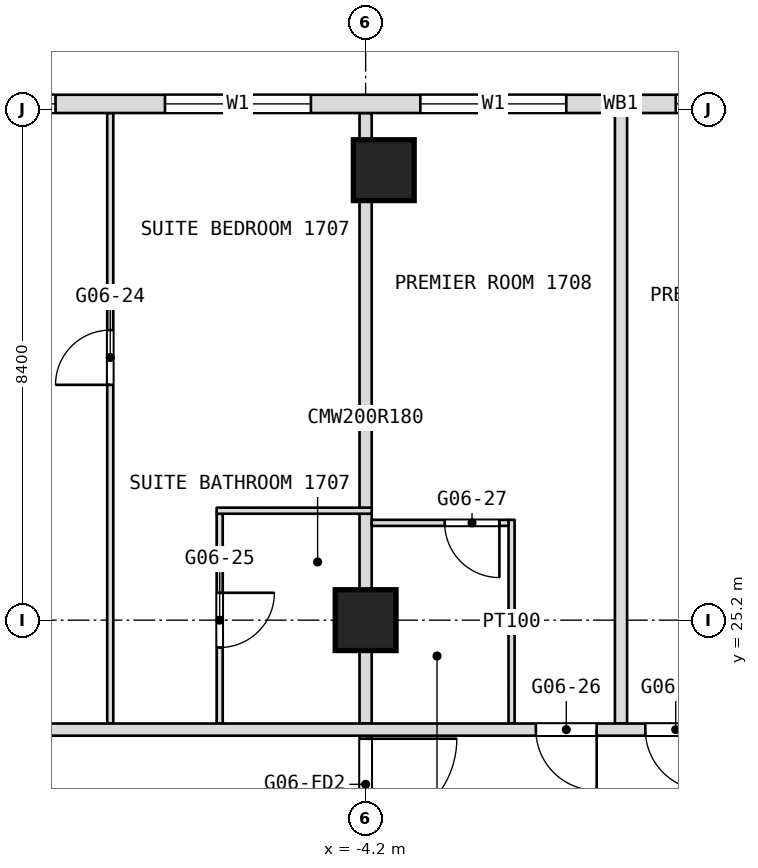
"""IFC4 building model, lengths in metres.
Left out: names, types, materials, properties, quantities, classifications, styles, units other than length and angle.
Written with IfcOpenShell. Run it as: python <this file> out.ifc"""

import sys

from ifc_helpers import new_model, si_unit, direction, frame, frame_2d, origin, origin_2d, place, context, subcontext, project, spatial, rectangle, extrude, element, fill, save


model = new_model("IFC4")
c1 = context("Model", 3, precision=1e-05, world=origin(), true_north=direction((0.0, 1.0)))
c2 = subcontext(c1, "Body", "Model", "MODEL_VIEW")
j1 = project(units=[si_unit("LENGTHUNIT", "METRE"), si_unit("PLANEANGLEUNIT", "RADIAN")], contexts=[c1])
p1 = place(None, origin())
s1 = spatial("IfcSite", under=j1, at=p1, CompositionType="ELEMENT")
p2 = place(p1, origin())
s2 = spatial("IfcBuilding", under=s1, at=p2, CompositionType="ELEMENT")
p3 = place(p2, frame((0.0, 0.0, 76.1)))
s3 = spatial("IfcBuildingStorey", under=s2, at=p3, CompositionType="ELEMENT", Elevation=76.1)
for number, where, z_axis, x_axis in (
    (1, (-4.2, 25.2, 0.0), (0.0, 0.0, 1.0), (1.0, 0.0, 0.0)),
    (2, (-3.901, 32.6, 0.0), (0.0, 0.0, 1.0), (1.0, 0.0, 0.0)),
):
    element("IfcColumn", number, at=place(p3, frame(where, z_axis=z_axis, x_axis=x_axis)), inside=s3, PredefinedType="COLUMN", context=c2, shape_type="SweptSolid", body=[
        extrude(rectangle(XDim=1.0, YDim=1.0, at=origin_2d()), origin(), (0.0, 0.0, 1.0), 3.6),
    ])
p4 = place(p3, frame((0.0, 23.5, 0.0), z_axis=(0.0, 0.0, 1.0), x_axis=(0.0, 1.0, 0.0)))
e3 = element("IfcWall", 3, at=p4, inside=s3, PredefinedType="PARTITIONING", context=c2, shape_type="SweptSolid", body=[
    extrude(rectangle(XDim=10.04, YDim=0.2, at=frame_2d((5.02, 0.0))), origin(), (0.0, 0.0, 1.0), 3.34),
])
p5 = place(p3, frame((-1.8, 23.5, 0.0), z_axis=(0.0, 0.0, 1.0), x_axis=(0.0, 1.0, 0.0)))
e4 = element("IfcWall", 4, at=p5, inside=s3, PredefinedType="PARTITIONING", context=c2, shape_type="SweptSolid", body=[
    extrude(rectangle(XDim=3.35, YDim=0.1, at=frame_2d((1.675, 0.0))), origin(), (0.0, 0.0, 1.0), 3.34),
])
p6 = place(p3, frame((-4.2, 16.8, 0.0), z_axis=(0.0, 0.0, 1.0), x_axis=(0.0, 1.0, 0.0)))
e5 = element("IfcWall", 5, at=p6, inside=s3, PredefinedType="PARTITIONING", context=c2, shape_type="SweptSolid", body=[
    extrude(rectangle(XDim=6.7, YDim=0.2, at=frame_2d((3.35, 0.0))), origin(), (0.0, 0.0, 1.0), 3.34),
])
p7 = place(p6, frame((0.15, 0.0, 0.0)))
e6 = element("IfcOpeningElement", 6, at=p7, cuts=e5, PredefinedType="OPENING", context=c2, shape_type="SweptSolid", body=[
    extrude(rectangle(XDim=1.5, YDim=2.1, at=frame_2d((0.75, 1.05))), frame((0.0, 0.1, 0.0), z_axis=(0.0, -1.0, 0.0), x_axis=(1.0, 0.0, 0.0)), (0.0, 0.0, 1.0), 0.2),
])
p8 = place(p6, frame((4.95, 0.0, 0.0)))
e7 = element("IfcOpeningElement", 7, at=p8, cuts=e5, PredefinedType="OPENING", context=c2, shape_type="SweptSolid", body=[
    extrude(rectangle(XDim=1.5, YDim=2.1, at=frame_2d((0.75, 1.05))), frame((0.0, 0.1, 0.0), z_axis=(0.0, -1.0, 0.0), x_axis=(1.0, 0.0, 0.0)), (0.0, 0.0, 1.0), 0.2),
])
p9 = place(p3, frame((-4.2, 23.5, 0.0), z_axis=(0.0, 0.0, 1.0), x_axis=(0.0, 1.0, 0.0)))
e8 = element("IfcWall", 8, at=p9, inside=s3, PredefinedType="PARTITIONING", context=c2, shape_type="SweptSolid", body=[
    extrude(rectangle(XDim=10.04, YDim=0.2, at=frame_2d((5.02, 0.0))), origin(), (0.0, 0.0, 1.0), 3.34),
])
p10 = place(p3, frame((-6.6, 23.5, 0.0), z_axis=(0.0, 0.0, 1.0), x_axis=(0.0, 1.0, 0.0)))
e9 = element("IfcWall", 9, at=p10, inside=s3, PredefinedType="PARTITIONING", context=c2, shape_type="SweptSolid", body=[
    extrude(rectangle(XDim=3.45, YDim=0.1, at=frame_2d((1.725, 0.0))), origin(), (0.0, 0.0, 1.0), 3.34),
])
p11 = place(p10, frame((1.25, 0.0, 0.0)))
e10 = element("IfcOpeningElement", 10, at=p11, cuts=e9, PredefinedType="OPENING", context=c2, shape_type="SweptSolid", body=[
    extrude(rectangle(XDim=0.9, YDim=2.1, at=frame_2d((0.45, 1.05))), frame((0.0, 0.05, 0.0), z_axis=(0.0, -1.0, 0.0), x_axis=(1.0, 0.0, 0.0)), (0.0, 0.0, 1.0), 0.1),
])
p12 = place(p3, frame((-8.4, 23.5, 0.0), z_axis=(0.0, 0.0, 1.0), x_axis=(0.0, 1.0, 0.0)))
e11 = element("IfcWall", 11, at=p12, inside=s3, PredefinedType="PARTITIONING", context=c2, shape_type="SweptSolid", body=[
    extrude(rectangle(XDim=10.04, YDim=0.1, at=frame_2d((5.02, 0.0))), origin(), (0.0, 0.0, 1.0), 3.34),
])
p13 = place(p12, frame((5.57, 0.0, 0.0)))
e12 = element("IfcOpeningElement", 12, at=p13, cuts=e11, PredefinedType="OPENING", context=c2, shape_type="SweptSolid", body=[
    extrude(rectangle(XDim=0.9, YDim=2.1, at=frame_2d((0.45, 1.05))), frame((0.0, 0.05, 0.0), z_axis=(0.0, -1.0, 0.0), x_axis=(1.0, 0.0, 0.0)), (0.0, 0.0, 1.0), 0.1),
])
p14 = place(p3, frame((-16.7, 23.4, 0.0), z_axis=(0.0, 0.0, 1.0), x_axis=(1.0, 0.0, 0.0)))
e13 = element("IfcWall", 13, at=p14, inside=s3, PredefinedType="PARTITIONING", context=c2, shape_type="SweptSolid", body=[
    extrude(rectangle(XDim=23.4, YDim=0.2, at=frame_2d((11.7, 0.0))), origin(), (0.0, 0.0, 1.0), 3.34),
])
p15 = place(p14, frame((2.4, 0.0, 0.0)))
e14 = element("IfcOpeningElement", 14, at=p15, cuts=e13, PredefinedType="OPENING", context=c2, shape_type="SweptSolid", body=[
    extrude(rectangle(XDim=0.9, YDim=2.1, at=frame_2d((0.45, 1.05))), frame((0.0, 0.1, 0.0), z_axis=(0.0, -1.0, 0.0), x_axis=(1.0, 0.0, 0.0)), (0.0, 0.0, 1.0), 0.2),
])
p16 = place(p14, frame((5.65, 0.0, 0.0)))
e15 = element("IfcOpeningElement", 15, at=p16, cuts=e13, PredefinedType="OPENING", context=c2, shape_type="SweptSolid", body=[
    extrude(rectangle(XDim=1.1, YDim=2.1, at=frame_2d((0.55, 1.05))), frame((0.0, 0.1, 0.0), z_axis=(0.0, -1.0, 0.0), x_axis=(1.0, 0.0, 0.0)), (0.0, 0.0, 1.0), 0.2),
])
p17 = place(p14, frame((15.3, 0.0, 0.0)))
e16 = element("IfcOpeningElement", 16, at=p17, cuts=e13, PredefinedType="OPENING", context=c2, shape_type="SweptSolid", body=[
    extrude(rectangle(XDim=1.0, YDim=2.1, at=frame_2d((0.5, 1.05))), frame((0.0, 0.1, 0.0), z_axis=(0.0, -1.0, 0.0), x_axis=(1.0, 0.0, 0.0)), (0.0, 0.0, 1.0), 0.2),
])
p18 = place(p14, frame((17.1, 0.0, 0.0)))
e17 = element("IfcOpeningElement", 17, at=p18, cuts=e13, PredefinedType="OPENING", context=c2, shape_type="SweptSolid", body=[
    extrude(rectangle(XDim=1.0, YDim=2.1, at=frame_2d((0.5, 1.05))), frame((0.0, 0.1, 0.0), z_axis=(0.0, -1.0, 0.0), x_axis=(1.0, 0.0, 0.0)), (0.0, 0.0, 1.0), 0.2),
])
p19 = place(p3, frame((-4.1, 26.8, 0.0), z_axis=(0.0, 0.0, 1.0), x_axis=(1.0, 0.0, 0.0)))
e18 = element("IfcWall", 18, at=p19, inside=s3, PredefinedType="PARTITIONING", context=c2, shape_type="SweptSolid", body=[
    extrude(rectangle(XDim=2.25, YDim=0.1, at=frame_2d((1.125, 0.0))), origin(), (0.0, 0.0, 1.0), 3.34),
])
p20 = place(p19, frame((1.2, 0.0, 0.0)))
e19 = element("IfcOpeningElement", 19, at=p20, cuts=e18, PredefinedType="OPENING", context=c2, shape_type="SweptSolid", body=[
    extrude(rectangle(XDim=0.9, YDim=2.1, at=frame_2d((0.45, 1.05))), frame((0.0, 0.05, 0.0), z_axis=(0.0, -1.0, 0.0), x_axis=(1.0, 0.0, 0.0)), (0.0, 0.0, 1.0), 0.1),
])
p21 = place(p3, frame((-6.65, 27.0, 0.0), z_axis=(0.0, 0.0, 1.0), x_axis=(1.0, 0.0, 0.0)))
e20 = element("IfcWall", 20, at=p21, inside=s3, PredefinedType="PARTITIONING", context=c2, shape_type="SweptSolid", body=[
    extrude(rectangle(XDim=2.55, YDim=0.1, at=frame_2d((1.275, 0.0))), origin(), (0.0, 0.0, 1.0), 3.34),
])
p22 = place(p3, frame((23.406, 33.69, 0.0), z_axis=(0.0, 0.0, 1.0), x_axis=(-1.0, 0.0, 0.0)))
e21 = element("IfcWall", 21, at=p22, inside=s3, PredefinedType="NOTDEFINED", context=c2, shape_type="SweptSolid", body=[
    extrude(rectangle(XDim=46.812, YDim=0.3, at=frame_2d((23.406, 0.0))), origin(), (0.0, 0.0, 1.0), 3.6),
])
p23 = place(p22, frame((2.186, 0.0, 0.9)))
e22 = element("IfcOpeningElement", 22, at=p23, cuts=e21, PredefinedType="OPENING", context=c2, shape_type="SweptSolid", body=[
    extrude(rectangle(XDim=2.4, YDim=2.1, at=frame_2d((1.2, 1.05))), frame((0.0, 0.15, 0.0), z_axis=(0.0, -1.0, 0.0), x_axis=(1.0, 0.0, 0.0)), (0.0, 0.0, 1.0), 0.3),
])
p24 = place(p22, frame((7.506, 0.0, 0.9)))
e23 = element("IfcOpeningElement", 23, at=p24, cuts=e21, PredefinedType="OPENING", context=c2, shape_type="SweptSolid", body=[
    extrude(rectangle(XDim=2.4, YDim=2.1, at=frame_2d((1.2, 1.05))), frame((0.0, 0.15, 0.0), z_axis=(0.0, -1.0, 0.0), x_axis=(1.0, 0.0, 0.0)), (0.0, 0.0, 1.0), 0.3),
])
p25 = place(p22, frame((11.706, 0.0, 0.9)))
e24 = element("IfcOpeningElement", 24, at=p25, cuts=e21, PredefinedType="OPENING", context=c2, shape_type="SweptSolid", body=[
    extrude(rectangle(XDim=2.4, YDim=2.1, at=frame_2d((1.2, 1.05))), frame((0.0, 0.15, 0.0), z_axis=(0.0, -1.0, 0.0), x_axis=(1.0, 0.0, 0.0)), (0.0, 0.0, 1.0), 0.3),
])
p26 = place(p22, frame((15.906, 0.0, 0.9)))
e25 = element("IfcOpeningElement", 25, at=p26, cuts=e21, PredefinedType="OPENING", context=c2, shape_type="SweptSolid", body=[
    extrude(rectangle(XDim=2.4, YDim=2.1, at=frame_2d((1.2, 1.05))), frame((0.0, 0.15, 0.0), z_axis=(0.0, -1.0, 0.0), x_axis=(1.0, 0.0, 0.0)), (0.0, 0.0, 1.0), 0.3),
])
p27 = place(p22, frame((20.106, 0.0, 0.9)))
e26 = element("IfcOpeningElement", 26, at=p27, cuts=e21, PredefinedType="OPENING", context=c2, shape_type="SweptSolid", body=[
    extrude(rectangle(XDim=2.4, YDim=2.1, at=frame_2d((1.2, 1.05))), frame((0.0, 0.15, 0.0), z_axis=(0.0, -1.0, 0.0), x_axis=(1.0, 0.0, 0.0)), (0.0, 0.0, 1.0), 0.3),
])
p28 = place(p22, frame((24.306, 0.0, 0.9)))
e27 = element("IfcOpeningElement", 27, at=p28, cuts=e21, PredefinedType="OPENING", context=c2, shape_type="SweptSolid", body=[
    extrude(rectangle(XDim=2.4, YDim=2.1, at=frame_2d((1.2, 1.05))), frame((0.0, 0.15, 0.0), z_axis=(0.0, -1.0, 0.0), x_axis=(1.0, 0.0, 0.0)), (0.0, 0.0, 1.0), 0.3),
])
p29 = place(p22, frame((28.506, 0.0, 0.9)))
e28 = element("IfcOpeningElement", 28, at=p29, cuts=e21, PredefinedType="OPENING", context=c2, shape_type="SweptSolid", body=[
    extrude(rectangle(XDim=2.4, YDim=2.1, at=frame_2d((1.2, 1.05))), frame((0.0, 0.15, 0.0), z_axis=(0.0, -1.0, 0.0), x_axis=(1.0, 0.0, 0.0)), (0.0, 0.0, 1.0), 0.3),
])
p30 = place(p22, frame((32.706, 0.0, 0.9)))
e29 = element("IfcOpeningElement", 29, at=p30, cuts=e21, PredefinedType="OPENING", context=c2, shape_type="SweptSolid", body=[
    extrude(rectangle(XDim=2.4, YDim=2.1, at=frame_2d((1.2, 1.05))), frame((0.0, 0.15, 0.0), z_axis=(0.0, -1.0, 0.0), x_axis=(1.0, 0.0, 0.0)), (0.0, 0.0, 1.0), 0.3),
])
p31 = place(p22, frame((36.906, 0.0, 0.9)))
e30 = element("IfcOpeningElement", 30, at=p31, cuts=e21, PredefinedType="OPENING", context=c2, shape_type="SweptSolid", body=[
    extrude(rectangle(XDim=2.4, YDim=2.1, at=frame_2d((1.2, 1.05))), frame((0.0, 0.15, 0.0), z_axis=(0.0, -1.0, 0.0), x_axis=(1.0, 0.0, 0.0)), (0.0, 0.0, 1.0), 0.3),
])
p32 = place(p22, frame((42.226, 0.0, 0.9)))
e31 = element("IfcOpeningElement", 31, at=p32, cuts=e21, PredefinedType="OPENING", context=c2, shape_type="SweptSolid", body=[
    extrude(rectangle(XDim=2.4, YDim=2.1, at=frame_2d((1.2, 1.05))), frame((0.0, 0.15, 0.0), z_axis=(0.0, -1.0, 0.0), x_axis=(1.0, 0.0, 0.0)), (0.0, 0.0, 1.0), 0.3),
])
p33 = place(p11, origin())
e32 = element("IfcDoor", 32, at=p33, inside=s3, OperationType="SINGLE_SWING_RIGHT", PredefinedType="DOOR", context=c2, shape_type="SweptSolid", body=[
    extrude(rectangle(XDim=0.9, YDim=2.1, at=frame_2d((0.45, 1.05))), frame((0.0, 0.025, 0.0), z_axis=(0.0, -1.0, 0.0), x_axis=(1.0, 0.0, 0.0)), (0.0, 0.0, 1.0), 0.05),
])
fill(e10, e32)
p34 = place(p13, origin())
e33 = element("IfcDoor", 33, at=p34, inside=s3, OperationType="SINGLE_SWING_RIGHT", PredefinedType="DOOR", context=c2, shape_type="SweptSolid", body=[
    extrude(rectangle(XDim=0.9, YDim=2.1, at=frame_2d((0.45, 1.05))), frame((0.0, 0.025, 0.0), z_axis=(0.0, -1.0, 0.0), x_axis=(1.0, 0.0, 0.0)), (0.0, 0.0, 1.0), 0.05),
])
fill(e12, e33)
p35 = place(p17, origin())
e34 = element("IfcDoor", 34, at=p35, inside=s3, OperationType="SINGLE_SWING_LEFT", PredefinedType="DOOR", context=c2, shape_type="SweptSolid", body=[
    extrude(rectangle(XDim=1.0, YDim=2.1, at=frame_2d((0.5, 1.05))), frame((0.0, 0.025, 0.0), z_axis=(0.0, -1.0, 0.0), x_axis=(1.0, 0.0, 0.0)), (0.0, 0.0, 1.0), 0.05),
])
fill(e16, e34)
p36 = place(p18, origin())
e35 = element("IfcDoor", 35, at=p36, inside=s3, OperationType="SINGLE_SWING_LEFT", PredefinedType="DOOR", context=c2, shape_type="SweptSolid", body=[
    extrude(rectangle(XDim=1.0, YDim=2.1, at=frame_2d((0.5, 1.05))), frame((0.0, 0.025, 0.0), z_axis=(0.0, -1.0, 0.0), x_axis=(1.0, 0.0, 0.0)), (0.0, 0.0, 1.0), 0.05),
])
fill(e17, e35)
p37 = place(p20, origin())
e36 = element("IfcDoor", 36, at=p37, inside=s3, OperationType="SINGLE_SWING_LEFT", PredefinedType="DOOR", context=c2, shape_type="SweptSolid", body=[
    extrude(rectangle(XDim=0.9, YDim=2.1, at=frame_2d((0.45, 1.05))), frame((0.0, 0.025, 0.0), z_axis=(0.0, -1.0, 0.0), x_axis=(1.0, 0.0, 0.0)), (0.0, 0.0, 1.0), 0.05),
])
fill(e19, e36)
p38 = place(p27, origin())
e37 = element("IfcWindow", 37, at=p38, inside=s3, PartitioningType="SINGLE_PANEL", PredefinedType="WINDOW", context=c2, shape_type="SweptSolid", body=[
    extrude(rectangle(XDim=2.4, YDim=2.1, at=frame_2d((1.2, 1.05))), frame((0.0, 0.03, 0.0), z_axis=(0.0, -1.0, 0.0), x_axis=(1.0, 0.0, 0.0)), (0.0, 0.0, 1.0), 0.06),
])
fill(e26, e37)
p39 = place(p28, origin())
e38 = element("IfcWindow", 38, at=p39, inside=s3, PartitioningType="SINGLE_PANEL", PredefinedType="WINDOW", context=c2, shape_type="SweptSolid", body=[
    extrude(rectangle(XDim=2.4, YDim=2.1, at=frame_2d((1.2, 1.05))), frame((0.0, 0.03, 0.0), z_axis=(0.0, -1.0, 0.0), x_axis=(1.0, 0.0, 0.0)), (0.0, 0.0, 1.0), 0.06),
])
fill(e27, e38)
p40 = place(p29, origin())
e39 = element("IfcWindow", 39, at=p40, inside=s3, PartitioningType="SINGLE_PANEL", PredefinedType="WINDOW", context=c2, shape_type="SweptSolid", body=[
    extrude(rectangle(XDim=2.4, YDim=2.1, at=frame_2d((1.2, 1.05))), frame((0.0, 0.03, 0.0), z_axis=(0.0, -1.0, 0.0), x_axis=(1.0, 0.0, 0.0)), (0.0, 0.0, 1.0), 0.06),
])
fill(e28, e39)
p41 = place(p30, origin())
e40 = element("IfcWindow", 40, at=p41, inside=s3, PartitioningType="SINGLE_PANEL", PredefinedType="WINDOW", context=c2, shape_type="SweptSolid", body=[
    extrude(rectangle(XDim=2.4, YDim=2.1, at=frame_2d((1.2, 1.05))), frame((0.0, 0.03, 0.0), z_axis=(0.0, -1.0, 0.0), x_axis=(1.0, 0.0, 0.0)), (0.0, 0.0, 1.0), 0.06),
])
fill(e29, e40)
p42 = place(p8, origin())
e41 = element("IfcDoor", 41, at=p42, inside=s3, OperationType="DOUBLE_DOOR_DOUBLE_SWING", PredefinedType="DOOR", context=c2, shape_type="SweptSolid", body=[
    extrude(rectangle(XDim=1.5, YDim=2.1, at=frame_2d((0.75, 1.05))), frame((0.0, 0.025, 0.0), z_axis=(0.0, -1.0, 0.0), x_axis=(1.0, 0.0, 0.0)), (0.0, 0.0, 1.0), 0.05),
])
fill(e7, e41)
save(model, sys.argv[1])
